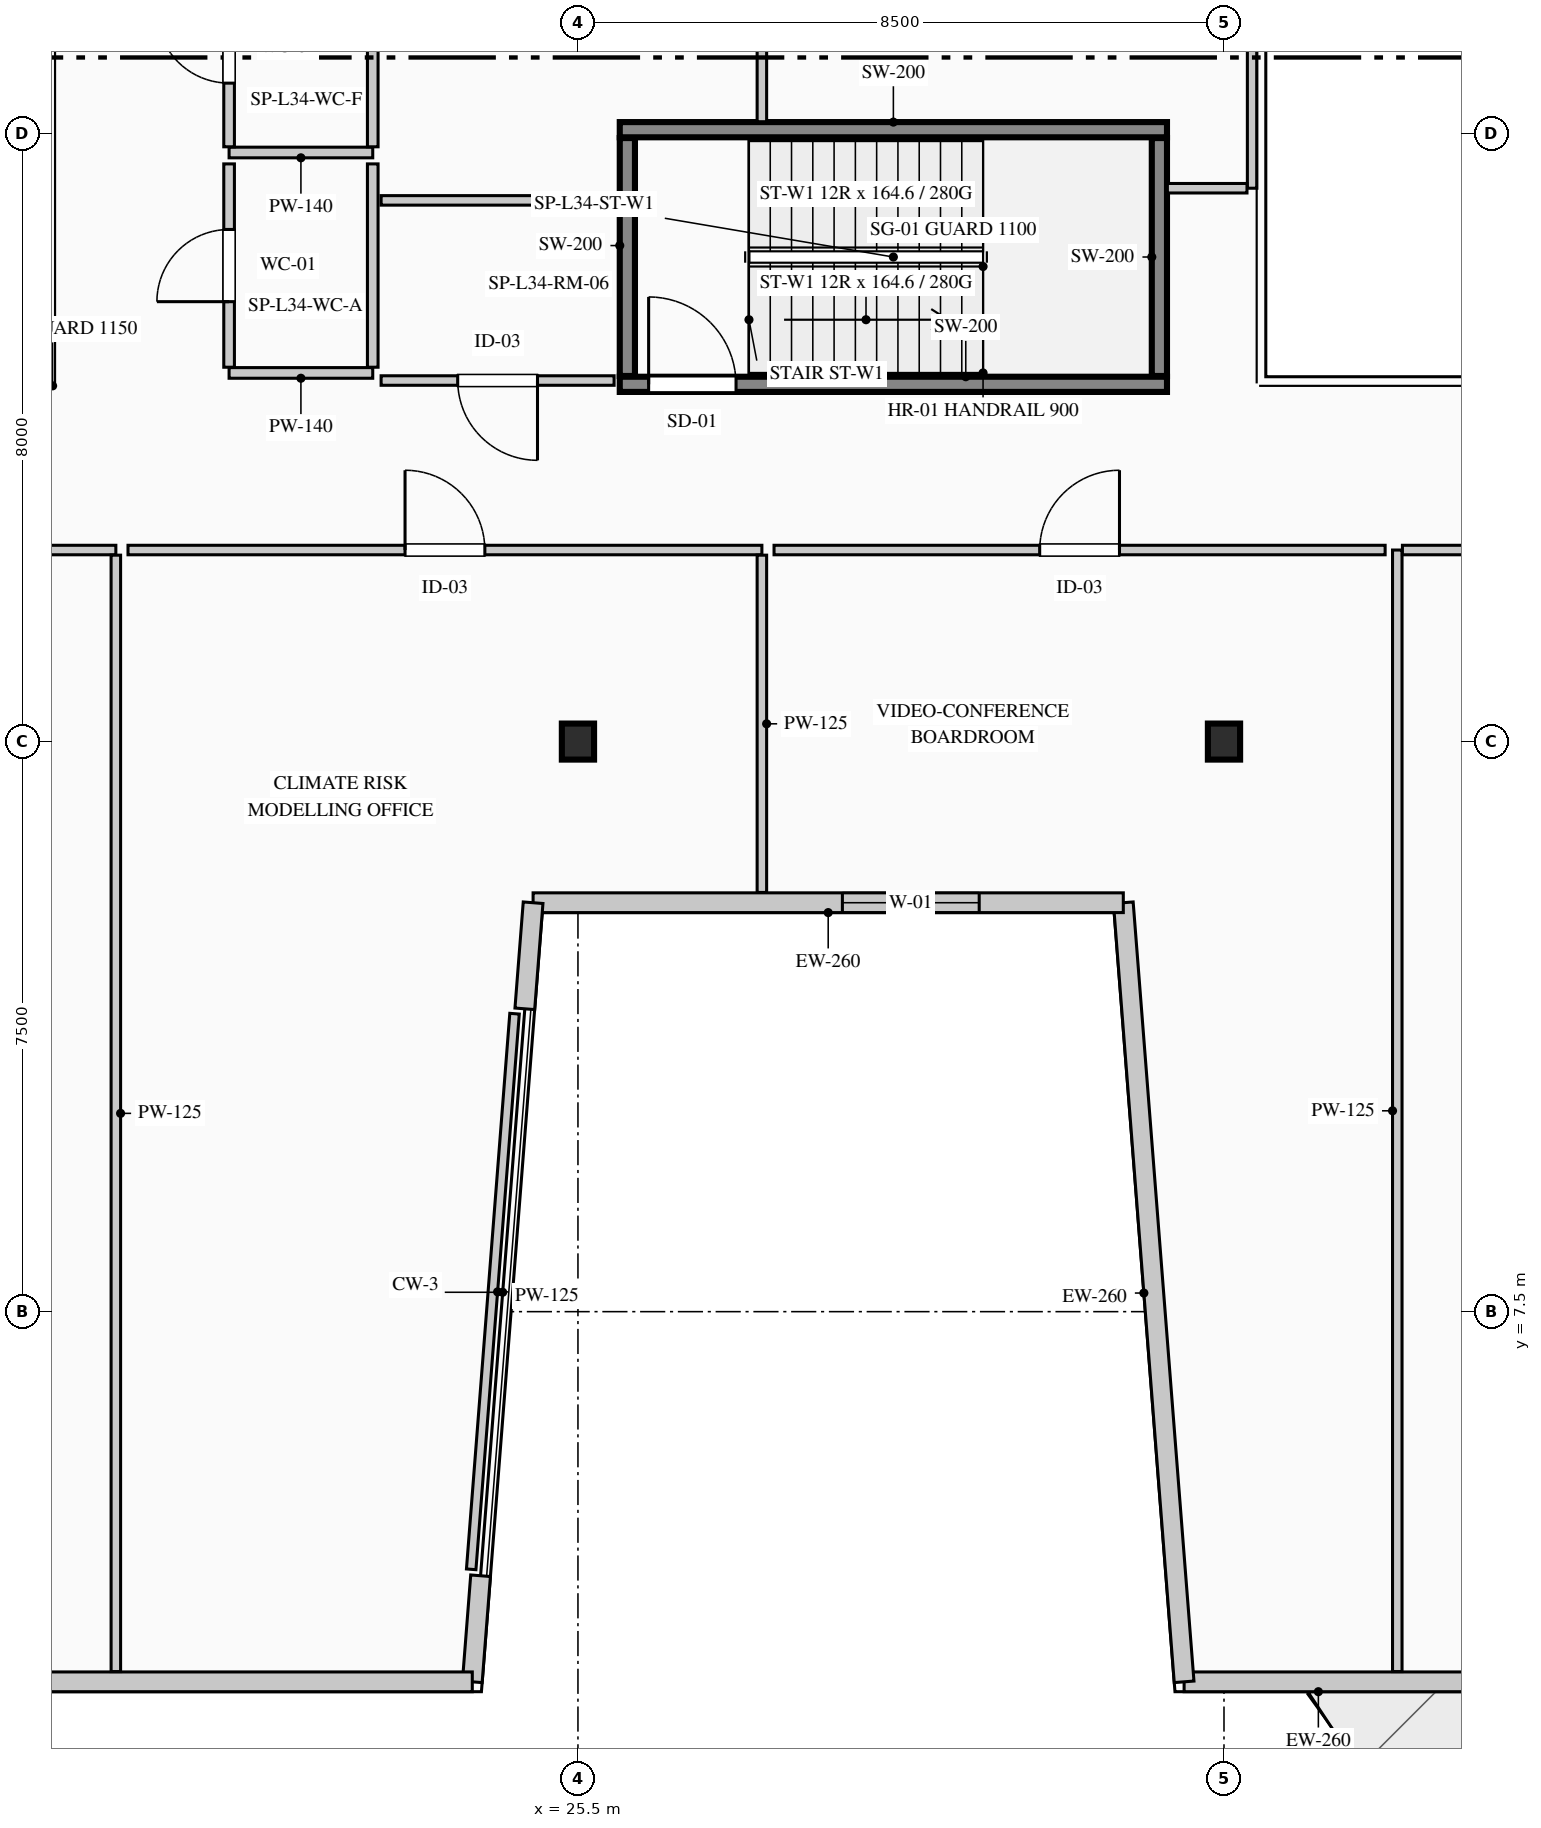
"""IFC4 building model, lengths in metres.
Left out: names, types, materials, properties, quantities, classifications, styles, units other than length and angle.
Written with IfcOpenShell. Run it as: python <this file> out.ifc"""

import sys

from ifc_helpers import new_model, si_unit, direction, frame, frame_2d, origin, origin_2d, place, context, subcontext, project, spatial, rectangle, i_section, extrude, element, fill, save


model = new_model("IFC4")
c1 = context("Model", 3, precision=1e-05, world=origin(), true_north=direction((0.0, 1.0)))
c2 = subcontext(c1, "Body", "Model", "MODEL_VIEW")
j1 = project(units=[si_unit("LENGTHUNIT", "METRE"), si_unit("PLANEANGLEUNIT", "RADIAN")], contexts=[c1])
p1 = place(None, origin())
s1 = spatial("IfcSite", under=j1, at=p1, CompositionType="ELEMENT")
p2 = place(p1, origin())
s2 = spatial("IfcBuilding", under=s1, at=p2, CompositionType="ELEMENT")
p3 = place(p2, frame((0.0, 0.0, 146.95)))
s3 = spatial("IfcBuildingStorey", under=s2, at=p3, CompositionType="ELEMENT", Elevation=146.95)
p4 = place(p3, frame((26.05, 19.7, 0.0), z_axis=(0.0, 0.0, 1.0), x_axis=(1.0, 0.0, 0.0)))
e1 = element("IfcWall", 1, at=p4, inside=s3, PredefinedType="SHEAR", context=c2, shape_type="SweptSolid", body=[
    extrude(rectangle(XDim=7.2, YDim=0.2, at=frame_2d((3.6, 0.0))), origin(), (0.0, 0.0, 1.0), 3.95),
])
p5 = place(p4, frame((0.38, 0.0, 0.0)))
e2 = element("IfcOpeningElement", 2, at=p5, cuts=e1, PredefinedType="OPENING", context=c2, shape_type="SweptSolid", body=[
    extrude(rectangle(XDim=1.15, YDim=2.2, at=frame_2d((0.575, 1.1))), frame((0.0, 0.11, 0.0), z_axis=(0.0, -1.0, 0.0), x_axis=(1.0, 0.0, 0.0)), (0.0, 0.0, 1.0), 0.22),
])
p6 = place(p3, frame((26.05, 23.05, 0.0), z_axis=(0.0, 0.0, 1.0), x_axis=(1.0, 0.0, 0.0)))
e3 = element("IfcWall", 3, at=p6, inside=s3, PredefinedType="SHEAR", context=c2, shape_type="SweptSolid", body=[
    extrude(rectangle(XDim=7.2, YDim=0.2, at=frame_2d((3.6, 0.0))), origin(), (0.0, 0.0, 1.0), 3.95),
])
for number, where, z_axis, x_axis in (
    (4, (26.15, 19.81, 0.0), (0.0, 0.0, 1.0), (0.0, 1.0, 0.0)),
    (5, (33.15, 19.81, 0.0), (0.0, 0.0, 1.0), (0.0, 1.0, 0.0)),
):
    element("IfcWall", number, at=place(p3, frame(where, z_axis=z_axis, x_axis=x_axis)), inside=s3, PredefinedType="SHEAR", context=c2, shape_type="SweptSolid", body=[
        extrude(rectangle(XDim=3.13, YDim=0.2, at=frame_2d((1.565, 0.0))), origin(), (0.0, 0.0, 1.0), 3.95),
    ])
for number, where, z_axis, x_axis in (
    (6, (25.5, 15.0, 0.0), (0.0, 0.0, 1.0), (1.0, 0.0, 0.0)),
    (7, (34.0, 15.0, 0.0), (0.0, 0.0, 1.0), (1.0, 0.0, 0.0)),
):
    element("IfcColumn", number, at=place(p3, frame(where, z_axis=z_axis, x_axis=x_axis)), inside=s3, PredefinedType="COLUMN", context=c2, shape_type="SweptSolid", body=[
        extrude(i_section(OverallWidth=0.424, OverallDepth=0.474, WebThickness=0.048, FlangeThickness=0.077, FilletRadius=0.015, at=origin_2d()), origin(), (0.0, 0.0, 1.0), 3.95),
    ])
p7 = place(p3, frame((42.44, 2.63, 0.0), z_axis=(0.0, 0.0, 1.0), x_axis=(-1.0, 0.0, 0.0)))
e8 = element("IfcWall", 8, at=p7, inside=s3, PredefinedType="STANDARD", context=c2, shape_type="SweptSolid", body=[
    extrude(rectangle(XDim=8.965, YDim=0.26, at=frame_2d((4.482, 0.0))), origin(), (0.0, 0.0, 1.0), 3.69),
])
p8 = place(p7, frame((3.882, 0.0, 0.0)))
e9 = element("IfcOpeningElement", 9, at=p8, cuts=e8, PredefinedType="OPENING", context=c2, shape_type="SweptSolid", body=[
    extrude(rectangle(XDim=1.2, YDim=2.2, at=frame_2d((0.6, 1.1))), frame((0.0, 0.14, 0.0), z_axis=(0.0, -1.0, 0.0), x_axis=(1.0, 0.0, 0.0)), (0.0, 0.0, 1.0), 0.28),
])
p9 = place(p3, frame((33.475, 2.63, 0.0), z_axis=(0.0, 0.0, 1.0), x_axis=(-0.077793257511, 0.996969512616, 0.0)))
e10 = element("IfcWall", 10, at=p9, inside=s3, PredefinedType="STANDARD", context=c2, shape_type="SweptSolid", body=[
    extrude(rectangle(XDim=10.281, YDim=0.26, at=frame_2d((5.141, 0.0))), origin(), (0.0, 0.0, 1.0), 3.69),
])
p10 = place(p3, frame((32.675, 12.88, 0.0), z_axis=(0.0, 0.0, 1.0), x_axis=(-1.0, 0.0, 0.0)))
e11 = element("IfcWall", 11, at=p10, inside=s3, PredefinedType="STANDARD", context=c2, shape_type="SweptSolid", body=[
    extrude(rectangle(XDim=7.765, YDim=0.26, at=frame_2d((3.883, 0.0))), origin(), (0.0, 0.0, 1.0), 3.69),
])
p11 = place(p10, frame((1.896, 0.0, 0.9)))
e12 = element("IfcOpeningElement", 12, at=p11, cuts=e11, PredefinedType="OPENING", context=c2, shape_type="SweptSolid", body=[
    extrude(rectangle(XDim=1.8, YDim=2.1, at=frame_2d((0.9, 1.05))), frame((0.0, 0.14, 0.0), z_axis=(0.0, -1.0, 0.0), x_axis=(1.0, 0.0, 0.0)), (0.0, 0.0, 1.0), 0.28),
])
for number, where, z_axis, x_axis in (
    (13, (24.91, 12.88, 0.0), (0.0, 0.0, 1.0), (-0.078, -0.997, 0.0)),
    (14, (24.219, 4.026, 0.0), (0.0, 0.0, 1.0), (-0.078, -0.997, 0.0)),
):
    element("IfcWall", number, at=place(p3, frame(where, z_axis=z_axis, x_axis=x_axis)), inside=s3, PredefinedType="STANDARD", context=c2, shape_type="SweptSolid", body=[
        extrude(rectangle(XDim=1.4, YDim=0.26, at=frame_2d((0.7, 0.0))), origin(), (0.0, 0.0, 1.0), 3.69),
    ])
p12 = place(p3, frame((24.11, 2.63, 0.0), z_axis=(0.0, 0.0, 1.0), x_axis=(-1.0, 0.0, 0.0)))
e15 = element("IfcWall", 15, at=p12, inside=s3, PredefinedType="STANDARD", context=c2, shape_type="SweptSolid", body=[
    extrude(rectangle(XDim=13.71, YDim=0.26, at=frame_2d((6.855, 0.0))), origin(), (0.0, 0.0, 1.0), 3.69),
])
p13 = place(p12, frame((7.724, 0.0, 0.9)))
e16 = element("IfcOpeningElement", 16, at=p13, cuts=e15, PredefinedType="OPENING", context=c2, shape_type="SweptSolid", body=[
    extrude(rectangle(XDim=2.1, YDim=2.0, at=frame_2d((1.05, 1.0))), frame((0.0, 0.14, 0.0), z_axis=(0.0, -1.0, 0.0), x_axis=(1.0, 0.0, 0.0)), (0.0, 0.0, 1.0), 0.28),
])
p14 = place(p3, frame((22.8, 22.75, 0.0), z_axis=(0.0, 0.0, 1.0), x_axis=(-1.0, 0.0, 0.0)))
e17 = element("IfcWall", 17, at=p14, inside=s3, PredefinedType="PARTITIONING", context=c2, shape_type="SweptSolid", body=[
    extrude(rectangle(XDim=1.89, YDim=0.14, at=frame_2d((0.945, 0.0))), origin(), (0.0, 0.0, 1.0), 3.69),
])
p15 = place(p3, frame((20.91, 22.825, 0.0), z_axis=(0.0, 0.0, 1.0), x_axis=(0.0, 1.0, 0.0)))
e18 = element("IfcWall", 18, at=p15, inside=s3, PredefinedType="PARTITIONING", context=c2, shape_type="SweptSolid", body=[
    extrude(rectangle(XDim=2.625, YDim=0.14, at=frame_2d((1.312, 0.0))), origin(), (0.0, 0.0, 1.0), 3.69),
])
p16 = place(p15, frame((0.837, 0.0, 0.0)))
e19 = element("IfcOpeningElement", 19, at=p16, cuts=e18, PredefinedType="OPENING", context=c2, shape_type="SweptSolid", body=[
    extrude(rectangle(XDim=0.95, YDim=2.15, at=frame_2d((0.475, 1.075))), frame((0.0, 0.08, 0.0), z_axis=(0.0, -1.0, 0.0), x_axis=(1.0, 0.0, 0.0)), (0.0, 0.0, 1.0), 0.16),
])
p17 = place(p3, frame((22.8, 25.45, 0.0), z_axis=(0.0, 0.0, 1.0), x_axis=(0.0, -1.0, 0.0)))
e20 = element("IfcWall", 20, at=p17, inside=s3, PredefinedType="PARTITIONING", context=c2, shape_type="SweptSolid", body=[
    extrude(rectangle(XDim=2.625, YDim=0.14, at=frame_2d((1.312, 0.0))), origin(), (0.0, 0.0, 1.0), 3.315),
])
p18 = place(p3, frame((22.8, 19.85, 0.0), z_axis=(0.0, 0.0, 1.0), x_axis=(-1.0, 0.0, 0.0)))
e21 = element("IfcWall", 21, at=p18, inside=s3, PredefinedType="PARTITIONING", context=c2, shape_type="SweptSolid", body=[
    extrude(rectangle(XDim=1.89, YDim=0.14, at=frame_2d((0.945, 0.0))), origin(), (0.0, 0.0, 1.0), 3.69),
])
p19 = place(p3, frame((20.91, 19.925, 0.0), z_axis=(0.0, 0.0, 1.0), x_axis=(0.0, 1.0, 0.0)))
e22 = element("IfcWall", 22, at=p19, inside=s3, PredefinedType="PARTITIONING", context=c2, shape_type="SweptSolid", body=[
    extrude(rectangle(XDim=2.675, YDim=0.14, at=frame_2d((1.337, 0.0))), origin(), (0.0, 0.0, 1.0), 3.69),
])
p20 = place(p19, frame((0.863, 0.0, 0.0)))
e23 = element("IfcOpeningElement", 23, at=p20, cuts=e22, PredefinedType="OPENING", context=c2, shape_type="SweptSolid", body=[
    extrude(rectangle(XDim=0.95, YDim=2.15, at=frame_2d((0.475, 1.075))), frame((0.0, 0.08, 0.0), z_axis=(0.0, -1.0, 0.0), x_axis=(1.0, 0.0, 0.0)), (0.0, 0.0, 1.0), 0.16),
])
p21 = place(p3, frame((22.8, 22.6, 0.0), z_axis=(0.0, 0.0, 1.0), x_axis=(0.0, -1.0, 0.0)))
e24 = element("IfcWall", 24, at=p21, inside=s3, PredefinedType="PARTITIONING", context=c2, shape_type="SweptSolid", body=[
    extrude(rectangle(XDim=2.675, YDim=0.14, at=frame_2d((1.337, 0.0))), origin(), (0.0, 0.0, 1.0), 3.315),
])
p22 = place(p3, frame((10.88, 17.52, 0.0), z_axis=(0.0, 0.0, 1.0), x_axis=(1.0, 0.0, 0.0)))
e25 = element("IfcWall", 25, at=p22, inside=s3, PredefinedType="PARTITIONING", context=c2, shape_type="SweptSolid", body=[
    extrude(rectangle(XDim=8.54, YDim=0.125, at=frame_2d((4.27, 0.0))), origin(), (0.0, 0.0, 1.0), 3.69),
])
p23 = place(p22, frame((3.745, 0.0, 0.0)))
e26 = element("IfcOpeningElement", 26, at=p23, cuts=e25, PredefinedType="OPENING", context=c2, shape_type="SweptSolid", body=[
    extrude(rectangle(XDim=1.05, YDim=2.15, at=frame_2d((0.525, 1.075))), frame((0.0, 0.073, 0.0), z_axis=(0.0, -1.0, 0.0), x_axis=(1.0, 0.0, 0.0)), (0.0, 0.0, 1.0), 0.145),
])
p24 = place(p3, frame((19.42, 17.452, 0.0), z_axis=(0.0, 0.0, 1.0), x_axis=(0.0, -1.0, 0.0)))
e27 = element("IfcWall", 27, at=p24, inside=s3, PredefinedType="PARTITIONING", context=c2, shape_type="SweptSolid", body=[
    extrude(rectangle(XDim=14.688, YDim=0.125, at=frame_2d((7.344, 0.0))), origin(), (0.0, 0.0, 1.0), 3.69),
])
p25 = place(p3, frame((24.666, 11.42, 0.0), z_axis=(0.0, 0.0, 1.0), x_axis=(-0.077816821526, -0.996967673642, 0.0)))
e28 = element("IfcWall", 28, at=p25, inside=s3, PredefinedType="PARTITIONING", context=c2, shape_type="SweptSolid", body=[
    extrude(rectangle(XDim=7.332, YDim=0.125, at=frame_2d((3.666, 0.0))), origin(), (0.0, 0.0, 1.0), 3.69),
])
p26 = place(p3, frame((19.58, 17.52, 0.0), z_axis=(0.0, 0.0, 1.0), x_axis=(1.0, 0.0, 0.0)))
e29 = element("IfcWall", 29, at=p26, inside=s3, PredefinedType="PARTITIONING", context=c2, shape_type="SweptSolid", body=[
    extrude(rectangle(XDim=8.34, YDim=0.125, at=frame_2d((4.17, 0.0))), origin(), (0.0, 0.0, 1.0), 3.475),
])
p27 = place(p26, frame((3.645, 0.0, 0.0)))
e30 = element("IfcOpeningElement", 30, at=p27, cuts=e29, PredefinedType="OPENING", context=c2, shape_type="SweptSolid", body=[
    extrude(rectangle(XDim=1.05, YDim=2.15, at=frame_2d((0.525, 1.075))), frame((0.0, 0.073, 0.0), z_axis=(0.0, -1.0, 0.0), x_axis=(1.0, 0.0, 0.0)), (0.0, 0.0, 1.0), 0.145),
])
p28 = place(p3, frame((27.92, 17.452, 0.0), z_axis=(0.0, 0.0, 1.0), x_axis=(0.0, -1.0, 0.0)))
e31 = element("IfcWall", 31, at=p28, inside=s3, PredefinedType="PARTITIONING", context=c2, shape_type="SweptSolid", body=[
    extrude(rectangle(XDim=4.438, YDim=0.125, at=frame_2d((2.219, 0.0))), origin(), (0.0, 0.0, 1.0), 3.69),
])
p29 = place(p3, frame((36.28, 2.765, 0.0), z_axis=(0.0, 0.0, 1.0), x_axis=(0.0, 1.0, 0.0)))
e32 = element("IfcWall", 32, at=p29, inside=s3, PredefinedType="PARTITIONING", context=c2, shape_type="SweptSolid", body=[
    extrude(rectangle(XDim=14.755, YDim=0.125, at=frame_2d((7.377, 0.0))), origin(), (0.0, 0.0, 1.0), 3.69),
])
p30 = place(p3, frame((36.347, 17.52, 0.0), z_axis=(0.0, 0.0, 1.0), x_axis=(1.0, 0.0, 0.0)))
e33 = element("IfcWall", 33, at=p30, inside=s3, PredefinedType="PARTITIONING", context=c2, shape_type="SweptSolid", body=[
    extrude(rectangle(XDim=8.603, YDim=0.125, at=frame_2d((4.301, 0.0))), origin(), (0.0, 0.0, 1.0), 3.69),
])
p31 = place(p30, frame((3.776, 0.0, 0.0)))
e34 = element("IfcOpeningElement", 34, at=p31, cuts=e33, PredefinedType="OPENING", context=c2, shape_type="SweptSolid", body=[
    extrude(rectangle(XDim=1.05, YDim=2.15, at=frame_2d((0.525, 1.075))), frame((0.0, 0.073, 0.0), z_axis=(0.0, -1.0, 0.0), x_axis=(1.0, 0.0, 0.0)), (0.0, 0.0, 1.0), 0.145),
])
p32 = place(p3, frame((28.08, 17.52, 0.0), z_axis=(0.0, 0.0, 1.0), x_axis=(1.0, 0.0, 0.0)))
e35 = element("IfcWall", 35, at=p32, inside=s3, PredefinedType="PARTITIONING", context=c2, shape_type="SweptSolid", body=[
    extrude(rectangle(XDim=8.04, YDim=0.125, at=frame_2d((4.02, 0.0))), origin(), (0.0, 0.0, 1.0), 3.475),
])
p33 = place(p32, frame((3.495, 0.0, 0.0)))
e36 = element("IfcOpeningElement", 36, at=p33, cuts=e35, PredefinedType="OPENING", context=c2, shape_type="SweptSolid", body=[
    extrude(rectangle(XDim=1.05, YDim=2.15, at=frame_2d((0.525, 1.075))), frame((0.0, 0.073, 0.0), z_axis=(0.0, -1.0, 0.0), x_axis=(1.0, 0.0, 0.0)), (0.0, 0.0, 1.0), 0.145),
])
p34 = place(p3, frame((25.976, 19.75, 0.0), z_axis=(0.0, 0.0, 1.0), x_axis=(-1.0, 0.0, 0.0)))
e37 = element("IfcWall", 37, at=p34, inside=s3, PredefinedType="PARTITIONING", context=c2, shape_type="SweptSolid", body=[
    extrude(rectangle(XDim=3.066, YDim=0.125, at=frame_2d((1.533, 0.0))), origin(), (0.0, 0.0, 1.0), 3.69),
])
p35 = place(p34, frame((1.008, 0.0, 0.0)))
e38 = element("IfcOpeningElement", 38, at=p35, cuts=e37, PredefinedType="OPENING", context=c2, shape_type="SweptSolid", body=[
    extrude(rectangle(XDim=1.05, YDim=2.15, at=frame_2d((0.525, 1.075))), frame((0.0, 0.073, 0.0), z_axis=(0.0, -1.0, 0.0), x_axis=(1.0, 0.0, 0.0)), (0.0, 0.0, 1.0), 0.145),
])
p36 = place(p3, frame((22.91, 22.12, 0.0), z_axis=(0.0, 0.0, 1.0), x_axis=(1.0, 0.0, 0.0)))
e39 = element("IfcWall", 39, at=p36, inside=s3, PredefinedType="PARTITIONING", context=c2, shape_type="SweptSolid", body=[
    extrude(rectangle(XDim=3.135, YDim=0.125, at=frame_2d((1.567, 0.0))), origin(), (0.0, 0.0, 1.0), 3.69),
])
p37 = place(p3, frame((27.92, 28.502, 0.0), z_axis=(0.0, 0.0, 1.0), x_axis=(0.0, -1.0, 0.0)))
e40 = element("IfcWall", 40, at=p37, inside=s3, PredefinedType="PARTITIONING", context=c2, shape_type="SweptSolid", body=[
    extrude(rectangle(XDim=5.347, YDim=0.125, at=frame_2d((2.674, 0.0))), origin(), (0.0, 0.0, 1.0), 3.69),
])
p38 = place(p3, frame((34.37, 28.502, 0.0), z_axis=(0.0, 0.0, 1.0), x_axis=(0.0, -1.0, 0.0)))
e41 = element("IfcWall", 41, at=p38, inside=s3, PredefinedType="PARTITIONING", context=c2, shape_type="SweptSolid", body=[
    extrude(rectangle(XDim=6.222, YDim=0.125, at=frame_2d((3.111, 0.0))), origin(), (0.0, 0.0, 1.0), 3.69),
])
p39 = place(p3, frame((34.302, 22.28, 0.0), z_axis=(0.0, 0.0, 1.0), x_axis=(-1.0, 0.0, 0.0)))
e42 = element("IfcWall", 42, at=p39, inside=s3, PredefinedType="PARTITIONING", context=c2, shape_type="SweptSolid", body=[
    extrude(rectangle(XDim=1.048, YDim=0.125, at=frame_2d((0.524, 0.0))), origin(), (0.0, 0.0, 1.0), 3.69),
])
p40 = place(p11, origin())
e43 = element("IfcWindow", 43, at=p40, inside=s3, PartitioningType="SINGLE_PANEL", PredefinedType="WINDOW", context=c2, shape_type="SweptSolid", body=[
    extrude(rectangle(XDim=1.8, YDim=2.1, at=frame_2d((0.9, 1.05))), frame((0.0, 0.03, 0.0), z_axis=(0.0, -1.0, 0.0), x_axis=(1.0, 0.0, 0.0)), (0.0, 0.0, 1.0), 0.06),
])
fill(e12, e43)
p41 = place(p5, origin())
e44 = element("IfcDoor", 44, at=p41, inside=s3, OperationType="SINGLE_SWING_LEFT", PredefinedType="DOOR", context=c2, shape_type="SweptSolid", body=[
    extrude(rectangle(XDim=1.15, YDim=2.2, at=frame_2d((0.575, 1.1))), frame((0.0, 0.025, 0.0), z_axis=(0.0, -1.0, 0.0), x_axis=(1.0, 0.0, 0.0)), (0.0, 0.0, 1.0), 0.05),
])
fill(e2, e44)
p42 = place(p16, origin())
e45 = element("IfcDoor", 45, at=p42, inside=s3, OperationType="SINGLE_SWING_RIGHT", PredefinedType="DOOR", context=c2, shape_type="SweptSolid", body=[
    extrude(rectangle(XDim=0.95, YDim=2.15, at=frame_2d((0.475, 1.075))), frame((0.0, 0.025, 0.0), z_axis=(0.0, -1.0, 0.0), x_axis=(1.0, 0.0, 0.0)), (0.0, 0.0, 1.0), 0.05),
])
fill(e19, e45)
p43 = place(p20, origin())
e46 = element("IfcDoor", 46, at=p43, inside=s3, OperationType="SINGLE_SWING_LEFT", PredefinedType="DOOR", context=c2, shape_type="SweptSolid", body=[
    extrude(rectangle(XDim=0.95, YDim=2.15, at=frame_2d((0.475, 1.075))), frame((0.0, 0.025, 0.0), z_axis=(0.0, -1.0, 0.0), x_axis=(1.0, 0.0, 0.0)), (0.0, 0.0, 1.0), 0.05),
])
fill(e23, e46)
p44 = place(p27, origin())
e47 = element("IfcDoor", 47, at=p44, inside=s3, OperationType="SINGLE_SWING_LEFT", PredefinedType="DOOR", context=c2, shape_type="SweptSolid", body=[
    extrude(rectangle(XDim=1.05, YDim=2.15, at=frame_2d((0.525, 1.075))), frame((0.0, 0.025, 0.0), z_axis=(0.0, -1.0, 0.0), x_axis=(1.0, 0.0, 0.0)), (0.0, 0.0, 1.0), 0.05),
])
fill(e30, e47)
p45 = place(p33, origin())
e48 = element("IfcDoor", 48, at=p45, inside=s3, OperationType="SINGLE_SWING_RIGHT", PredefinedType="DOOR", context=c2, shape_type="SweptSolid", body=[
    extrude(rectangle(XDim=1.05, YDim=2.15, at=frame_2d((0.525, 1.075))), frame((0.0, 0.025, 0.0), z_axis=(0.0, -1.0, 0.0), x_axis=(1.0, 0.0, 0.0)), (0.0, 0.0, 1.0), 0.05),
])
fill(e36, e48)
p46 = place(p35, origin())
e49 = element("IfcDoor", 49, at=p46, inside=s3, OperationType="SINGLE_SWING_LEFT", PredefinedType="DOOR", context=c2, shape_type="SweptSolid", body=[
    extrude(rectangle(XDim=1.05, YDim=2.15, at=frame_2d((0.525, 1.075))), frame((0.0, 0.025, 0.0), z_axis=(0.0, -1.0, 0.0), x_axis=(1.0, 0.0, 0.0)), (0.0, 0.0, 1.0), 0.05),
])
fill(e38, e49)
save(model, sys.argv[1])
